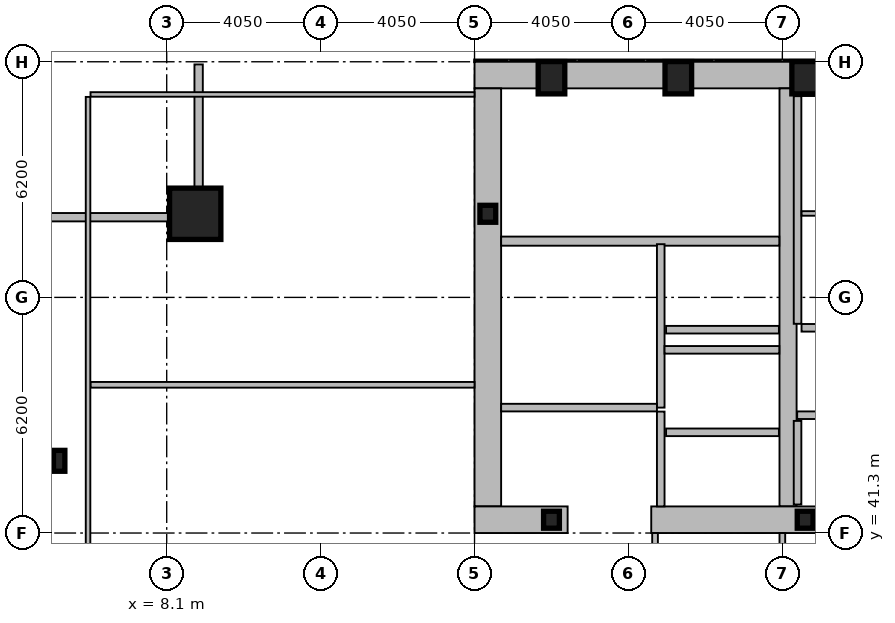
"""IFC4 building model, lengths in metres.
Left out: names, types, materials, properties, quantities, classifications, styles, units other than length and angle.
Written with IfcOpenShell. Run it as: python <this file> out.ifc"""

import sys

from ifc_helpers import new_model, si_unit, direction, frame, frame_2d, origin, origin_2d, place, context, subcontext, project, spatial, rectangle, hollow_rectangle, i_section, extrude, element, fill, save


model = new_model("IFC4")
c1 = context("Model", 3, precision=1e-05, world=origin(), true_north=direction((0.0, 1.0)))
c2 = subcontext(c1, "Body", "Model", "MODEL_VIEW")
j1 = project(units=[si_unit("LENGTHUNIT", "METRE"), si_unit("PLANEANGLEUNIT", "RADIAN")], contexts=[c1])
p1 = place(None, origin())
s1 = spatial("IfcSite", under=j1, at=p1, CompositionType="ELEMENT")
p2 = place(p1, origin())
s2 = spatial("IfcBuilding", under=s1, at=p2, CompositionType="ELEMENT")
p3 = place(p2, frame((0.0, 0.0, 154.2)))
s3 = spatial("IfcBuildingStorey", under=s2, at=p3, CompositionType="ELEMENT", Elevation=154.2)
p4 = place(p3, frame((16.2, 53.35, 0.0), z_axis=(0.0, 0.0, 1.0), x_axis=(1.0, 0.0, 0.0)))
e1 = element("IfcWall", 1, at=p4, inside=s3, PredefinedType="SHEAR", context=c2, shape_type="SweptSolid", body=[
    extrude(rectangle(XDim=40.5, YDim=0.7, at=frame_2d((20.25, 0.0))), origin(), (0.0, 0.0, 1.0), 3.44),
])
p5 = place(p3, frame((16.55, 42.0, 0.0), z_axis=(0.0, 0.0, 1.0), x_axis=(0.0, 1.0, 0.0)))
e2 = element("IfcWall", 2, at=p5, inside=s3, PredefinedType="SHEAR", context=c2, shape_type="SweptSolid", body=[
    extrude(rectangle(XDim=11.0, YDim=0.7, at=frame_2d((5.5, 0.0))), origin(), (0.0, 0.0, 1.0), 3.44),
])
p6 = place(p3, frame((24.45, 42.0, 0.0), z_axis=(0.0, 0.0, 1.0), x_axis=(0.0, 1.0, 0.0)))
e3 = element("IfcWall", 3, at=p6, inside=s3, PredefinedType="SHEAR", context=c2, shape_type="SweptSolid", body=[
    extrude(rectangle(XDim=11.0, YDim=0.45, at=frame_2d((5.5, 0.0))), origin(), (0.0, 0.0, 1.0), 3.44),
])
p7 = place(p3, frame((18.65, 41.65, 0.0), z_axis=(0.0, 0.0, 1.0), x_axis=(-1.0, 0.0, 0.0)))
e4 = element("IfcWall", 4, at=p7, inside=s3, PredefinedType="SHEAR", context=c2, shape_type="SweptSolid", body=[
    extrude(rectangle(XDim=2.45, YDim=0.7, at=frame_2d((1.225, 0.0))), origin(), (0.0, 0.0, 1.0), 3.44),
])
p8 = place(p3, frame((32.3, 41.65, 0.0), z_axis=(0.0, 0.0, 1.0), x_axis=(-1.0, 0.0, 0.0)))
e5 = element("IfcWall", 5, at=p8, inside=s3, PredefinedType="SHEAR", context=c2, shape_type="SweptSolid", body=[
    extrude(rectangle(XDim=11.45, YDim=0.7, at=frame_2d((5.725, 0.0))), origin(), (0.0, 0.0, 1.0), 3.44),
])
p9 = place(p3, frame((16.9, 48.98, 0.0), z_axis=(0.0, 0.0, 1.0), x_axis=(1.0, 0.0, 0.0)))
e6 = element("IfcWall", 6, at=p9, inside=s3, PredefinedType="SHEAR", context=c2, shape_type="SweptSolid", body=[
    extrude(rectangle(XDim=7.32, YDim=0.24, at=frame_2d((3.66, 0.0))), origin(), (0.0, 0.0, 1.0), 3.44),
])
p10 = place(p9, frame((0.22, 0.0, 0.0)))
e7 = element("IfcOpeningElement", 7, at=p10, cuts=e6, PredefinedType="OPENING", context=c2, shape_type="SweptSolid", body=[
    extrude(rectangle(XDim=1.05, YDim=2.15, at=frame_2d((0.525, 1.075))), frame((0.0, 0.13, 0.0), z_axis=(0.0, -1.0, 0.0), x_axis=(1.0, 0.0, 0.0)), (0.0, 0.0, 1.0), 0.26),
])
p11 = place(p3, frame((8.85, 49.7, 0.0), z_axis=(0.0, 0.0, 1.0), x_axis=(1.0, 0.0, 0.0)))
e8 = element("IfcColumn", 8, at=p11, inside=s3, PredefinedType="COLUMN", context=c2, shape_type="SweptSolid", body=[
    extrude(hollow_rectangle(XDim=1.35, YDim=1.35, WallThickness=0.065, at=origin_2d()), origin(), (0.0, 0.0, 1.0), 3.6),
])
for number, where, z_axis, x_axis in (
    (9, (18.225, 53.28, 0.0), (0.0, 0.0, 1.0), (1.0, 0.0, 0.0)),
    (10, (21.562, 53.28, 0.0), (0.0, 0.0, 1.0), (1.0, 0.0, 0.0)),
    (11, (24.9, 53.28, 0.0), (0.0, 0.0, 1.0), (1.0, 0.0, 0.0)),
):
    element("IfcColumn", number, at=place(p3, frame(where, z_axis=z_axis, x_axis=x_axis)), inside=s3, PredefinedType="COLUMN", context=c2, shape_type="SweptSolid", body=[
        extrude(hollow_rectangle(XDim=0.7, YDim=0.85, WallThickness=0.05, at=origin_2d()), origin(), (0.0, 0.0, 1.0), 3.6),
    ])
p12 = place(p3, frame((5.27, 43.2, 0.0), z_axis=(0.0, 0.0, 1.0), x_axis=(1.0, 0.0, 0.0)))
e12 = element("IfcColumn", 12, at=p12, inside=s3, PredefinedType="COLUMN", context=c2, shape_type="SweptSolid", body=[
    extrude(i_section(OverallWidth=0.3, OverallDepth=0.55, WebThickness=0.015, FlangeThickness=0.029, at=origin_2d()), origin(), (0.0, 0.0, 1.0), 3.6),
])
for number, where, z_axis, x_axis in (
    (13, (16.55, 49.7, 0.0), (0.0, 0.0, 1.0), (1.0, 0.0, 0.0)),
    (14, (18.225, 41.65, 0.0), (0.0, 0.0, 1.0), (1.0, 0.0, 0.0)),
    (15, (24.9, 41.65, 0.0), (0.0, 0.0, 1.0), (1.0, 0.0, 0.0)),
):
    element("IfcColumn", number, at=place(p3, frame(where, z_axis=z_axis, x_axis=x_axis)), inside=s3, PredefinedType="COLUMN", context=c2, shape_type="SweptSolid", body=[
        extrude(i_section(OverallWidth=0.416, OverallDepth=0.446, WebThickness=0.039, FlangeThickness=0.063, at=origin_2d()), origin(), (0.0, 0.0, 1.0), 3.6),
    ])
p13 = place(p3, frame((4.83, 49.61, 0.0), z_axis=(0.0, 0.0, 1.0), x_axis=(1.0, 0.0, 0.0)))
e16 = element("IfcWall", 16, at=p13, inside=s3, PredefinedType="SOLIDWALL", context=c2, shape_type="SweptSolid", body=[
    extrude(rectangle(XDim=4.22, YDim=0.22, at=frame_2d((2.11, 0.0))), origin(), (0.0, 0.0, 1.0), 2.83),
])
p14 = place(p3, frame((8.94, 49.72, 0.0), z_axis=(0.0, 0.0, 1.0), x_axis=(0.0, 1.0, 0.0)))
e17 = element("IfcWall", 17, at=p14, inside=s3, PredefinedType="SOLIDWALL", context=c2, shape_type="SweptSolid", body=[
    extrude(rectangle(XDim=3.91, YDim=0.22, at=frame_2d((1.955, 0.0))), origin(), (0.0, 0.0, 1.0), 2.83),
])
p15 = place(p3, frame((24.69, 44.4, 0.0), z_axis=(0.0, 0.0, 1.0), x_axis=(1.0, 0.0, 0.0)))
e18 = element("IfcWall", 18, at=p15, inside=s3, PredefinedType="PARTITIONING", context=c2, shape_type="SweptSolid", body=[
    extrude(rectangle(XDim=6.53, YDim=0.2, at=frame_2d((3.265, 0.0))), origin(), (0.0, 0.0, 1.0), 3.44),
])
p16 = place(p15, frame((0.53, 0.0, 0.0)))
e19 = element("IfcOpeningElement", 19, at=p16, cuts=e18, PredefinedType="OPENING", context=c2, shape_type="SweptSolid", body=[
    extrude(rectangle(XDim=1.1, YDim=2.18, at=frame_2d((0.55, 1.09))), frame((0.0, 0.11, 0.0), z_axis=(0.0, -1.0, 0.0), x_axis=(1.0, 0.0, 0.0)), (0.0, 0.0, 1.0), 0.22),
])
p17 = place(p15, frame((2.69, 0.0, 0.0)))
e20 = element("IfcOpeningElement", 20, at=p17, cuts=e18, PredefinedType="OPENING", context=c2, shape_type="SweptSolid", body=[
    extrude(rectangle(XDim=1.1, YDim=2.18, at=frame_2d((0.55, 1.09))), frame((0.0, 0.11, 0.0), z_axis=(0.0, -1.0, 0.0), x_axis=(1.0, 0.0, 0.0)), (0.0, 0.0, 1.0), 0.22),
])
p18 = place(p15, frame((4.85, 0.0, 0.0)))
e21 = element("IfcOpeningElement", 21, at=p18, cuts=e18, PredefinedType="OPENING", context=c2, shape_type="SweptSolid", body=[
    extrude(rectangle(XDim=1.1, YDim=2.18, at=frame_2d((0.55, 1.09))), frame((0.0, 0.11, 0.0), z_axis=(0.0, -1.0, 0.0), x_axis=(1.0, 0.0, 0.0)), (0.0, 0.0, 1.0), 0.22),
])
p19 = place(p3, frame((24.21, 43.95, 0.0), z_axis=(0.0, 0.0, 1.0), x_axis=(-1.0, 0.0, 0.0)))
e22 = element("IfcWall", 22, at=p19, inside=s3, PredefinedType="PARTITIONING", context=c2, shape_type="SweptSolid", body=[
    extrude(rectangle(XDim=2.97, YDim=0.2, at=frame_2d((1.485, 0.0))), origin(), (0.0, 0.0, 1.0), 3.44),
])
p20 = place(p19, frame((0.86, 0.0, 0.0)))
e23 = element("IfcOpeningElement", 23, at=p20, cuts=e22, PredefinedType="OPENING", context=c2, shape_type="SweptSolid", body=[
    extrude(rectangle(XDim=1.3, YDim=2.18, at=frame_2d((0.65, 1.09))), frame((0.0, 0.11, 0.0), z_axis=(0.0, -1.0, 0.0), x_axis=(1.0, 0.0, 0.0)), (0.0, 0.0, 1.0), 0.22),
])
p21 = place(p3, frame((24.21, 46.65, 0.0), z_axis=(0.0, 0.0, 1.0), x_axis=(-1.0, 0.0, 0.0)))
e24 = element("IfcWall", 24, at=p21, inside=s3, PredefinedType="PARTITIONING", context=c2, shape_type="SweptSolid", body=[
    extrude(rectangle(XDim=2.97, YDim=0.2, at=frame_2d((1.485, 0.0))), origin(), (0.0, 0.0, 1.0), 3.44),
])
p22 = place(p21, frame((0.91, 0.0, 0.0)))
e25 = element("IfcOpeningElement", 25, at=p22, cuts=e24, PredefinedType="OPENING", context=c2, shape_type="SweptSolid", body=[
    extrude(rectangle(XDim=1.2, YDim=2.18, at=frame_2d((0.6, 1.09))), frame((0.0, 0.11, 0.0), z_axis=(0.0, -1.0, 0.0), x_axis=(1.0, 0.0, 0.0)), (0.0, 0.0, 1.0), 0.22),
])
p23 = place(p3, frame((21.1, 44.6, 0.0), z_axis=(0.0, 0.0, 1.0), x_axis=(0.0, 1.0, 0.0)))
e26 = element("IfcWall", 26, at=p23, inside=s3, PredefinedType="PARTITIONING", context=c2, shape_type="SweptSolid", body=[
    extrude(rectangle(XDim=4.3, YDim=0.2, at=frame_2d((2.15, 0.0))), origin(), (0.0, 0.0, 1.0), 3.44),
])
p24 = place(p3, frame((16.9, 44.6, 0.0), z_axis=(0.0, 0.0, 1.0), x_axis=(1.0, 0.0, 0.0)))
e27 = element("IfcWall", 27, at=p24, inside=s3, PredefinedType="PARTITIONING", context=c2, shape_type="SweptSolid", body=[
    extrude(rectangle(XDim=4.1, YDim=0.2, at=frame_2d((2.05, 0.0))), origin(), (0.0, 0.0, 1.0), 3.44),
])
p25 = place(p24, frame((1.25, 0.0, 0.0)))
e28 = element("IfcOpeningElement", 28, at=p25, cuts=e27, PredefinedType="OPENING", context=c2, shape_type="SweptSolid", body=[
    extrude(rectangle(XDim=1.05, YDim=2.15, at=frame_2d((0.525, 1.075))), frame((0.0, 0.11, 0.0), z_axis=(0.0, -1.0, 0.0), x_axis=(1.0, 0.0, 0.0)), (0.0, 0.0, 1.0), 0.22),
])
p26 = place(p3, frame((21.2, 46.12, 0.0), z_axis=(0.0, 0.0, 1.0), x_axis=(1.0, 0.0, 0.0)))
e29 = element("IfcWall", 29, at=p26, inside=s3, PredefinedType="PARTITIONING", context=c2, shape_type="SweptSolid", body=[
    extrude(rectangle(XDim=3.02, YDim=0.2, at=frame_2d((1.51, 0.0))), origin(), (0.0, 0.0, 1.0), 3.44),
])
p27 = place(p3, frame((21.1, 42.0, 0.0), z_axis=(0.0, 0.0, 1.0), x_axis=(0.0, 1.0, 0.0)))
e30 = element("IfcWall", 30, at=p27, inside=s3, PredefinedType="PARTITIONING", context=c2, shape_type="SweptSolid", body=[
    extrude(rectangle(XDim=2.495, YDim=0.2, at=frame_2d((1.248, 0.0))), origin(), (0.0, 0.0, 1.0), 3.44),
])
p28 = place(p27, frame((0.38, 0.0, 0.0)))
e31 = element("IfcOpeningElement", 31, at=p28, cuts=e30, PredefinedType="OPENING", context=c2, shape_type="SweptSolid", body=[
    extrude(rectangle(XDim=1.05, YDim=2.15, at=frame_2d((0.525, 1.075))), frame((0.0, 0.11, 0.0), z_axis=(0.0, -1.0, 0.0), x_axis=(1.0, 0.0, 0.0)), (0.0, 0.0, 1.0), 0.22),
])
p29 = place(p3, frame((24.7, 46.805, 0.0), z_axis=(0.0, 0.0, 1.0), x_axis=(0.0, 1.0, 0.0)))
e32 = element("IfcWall", 32, at=p29, inside=s3, PredefinedType="PARTITIONING", context=c2, shape_type="SweptSolid", body=[
    extrude(rectangle(XDim=5.99, YDim=0.2, at=frame_2d((2.995, 0.0))), origin(), (0.0, 0.0, 1.0), 3.44),
])
p30 = place(p3, frame((24.805, 52.86, 0.0), z_axis=(0.0, 0.0, 1.0), x_axis=(1.0, 0.0, 0.0)))
e33 = element("IfcWall", 33, at=p30, inside=s3, PredefinedType="PARTITIONING", context=c2, shape_type="SweptSolid", body=[
    extrude(rectangle(XDim=7.51, YDim=0.12, at=frame_2d((3.755, 0.0))), origin(), (0.0, 0.0, 1.0), 3.44),
])
p31 = place(p3, frame((24.805, 49.709, 0.0), z_axis=(0.0, 0.0, 1.0), x_axis=(1.0, 0.0, 0.0)))
e34 = element("IfcWall", 34, at=p31, inside=s3, PredefinedType="PARTITIONING", context=c2, shape_type="SweptSolid", body=[
    extrude(rectangle(XDim=7.51, YDim=0.12, at=frame_2d((3.755, 0.0))), origin(), (0.0, 0.0, 1.0), 3.44),
])
p32 = place(p31, frame((2.4, 0.0, 0.0)))
e35 = element("IfcOpeningElement", 35, at=p32, cuts=e34, PredefinedType="OPENING", context=c2, shape_type="SweptSolid", body=[
    extrude(rectangle(XDim=0.9, YDim=2.05, at=frame_2d((0.45, 1.025))), frame((0.0, 0.07, 0.0), z_axis=(0.0, -1.0, 0.0), x_axis=(1.0, 0.0, 0.0)), (0.0, 0.0, 1.0), 0.14),
])
p33 = place(p3, frame((24.805, 46.7, 0.0), z_axis=(0.0, 0.0, 1.0), x_axis=(1.0, 0.0, 0.0)))
e36 = element("IfcWall", 36, at=p33, inside=s3, PredefinedType="PARTITIONING", context=c2, shape_type="SweptSolid", body=[
    extrude(rectangle(XDim=7.51, YDim=0.2, at=frame_2d((3.755, 0.0))), origin(), (0.0, 0.0, 1.0), 3.44),
])
p34 = place(p33, frame((2.4, 0.0, 0.0)))
e37 = element("IfcOpeningElement", 37, at=p34, cuts=e36, PredefinedType="OPENING", context=c2, shape_type="SweptSolid", body=[
    extrude(rectangle(XDim=0.95, YDim=2.1, at=frame_2d((0.475, 1.05))), frame((0.0, 0.11, 0.0), z_axis=(0.0, -1.0, 0.0), x_axis=(1.0, 0.0, 0.0)), (0.0, 0.0, 1.0), 0.22),
])
p35 = place(p3, frame((24.7, 42.05, 0.0), z_axis=(0.0, 0.0, 1.0), x_axis=(0.0, 1.0, 0.0)))
e38 = element("IfcWall", 38, at=p35, inside=s3, PredefinedType="PARTITIONING", context=c2, shape_type="SweptSolid", body=[
    extrude(rectangle(XDim=2.2, YDim=0.2, at=frame_2d((1.1, 0.0))), origin(), (0.0, 0.0, 1.0), 3.44),
])
for number, where, z_axis, x_axis in (
    (39, (20.95, 38.28, 0.0), (0.0, 0.0, 1.0), (0.0, 1.0, 0.0)),
    (40, (24.3, 38.28, 0.0), (0.0, 0.0, 1.0), (0.0, 1.0, 0.0)),
):
    element("IfcWall", number, at=place(p3, frame(where, z_axis=z_axis, x_axis=x_axis)), inside=s3, PredefinedType="PARTITIONING", context=c2, shape_type="SweptSolid", body=[
        extrude(rectangle(XDim=3.02, YDim=0.15, at=frame_2d((1.51, 0.0))), origin(), (0.0, 0.0, 1.0), 3.44),
    ])
p36 = place(p3, frame((6.095, 45.2, 0.0), z_axis=(0.0, 0.0, 1.0), x_axis=(1.0, 0.0, 0.0)))
e41 = element("IfcWall", 41, at=p36, inside=s3, PredefinedType="PARTITIONING", context=c2, shape_type="SweptSolid", body=[
    extrude(rectangle(XDim=10.105, YDim=0.15, at=frame_2d((5.052, 0.0))), origin(), (0.0, 0.0, 1.0), 2.83),
])
p37 = place(p36, frame((8.32, 0.0, 0.0)))
e42 = element("IfcOpeningElement", 42, at=p37, cuts=e41, PredefinedType="OPENING", context=c2, shape_type="SweptSolid", body=[
    extrude(rectangle(XDim=0.9, YDim=2.05, at=frame_2d((0.45, 1.025))), frame((0.0, 0.085, 0.0), z_axis=(0.0, -1.0, 0.0), x_axis=(1.0, 0.0, 0.0)), (0.0, 0.0, 1.0), 0.17),
])
p38 = place(p3, frame((6.03, 10.665, 0.0), z_axis=(0.0, 0.0, 1.0), x_axis=(0.0, 1.0, 0.0)))
e43 = element("IfcWall", 43, at=p38, inside=s3, PredefinedType="PARTITIONING", context=c2, shape_type="SweptSolid", body=[
    extrude(rectangle(XDim=42.11, YDim=0.12, at=frame_2d((21.055, 0.0))), origin(), (0.0, 0.0, 1.0), 2.73),
])
p39 = place(p3, frame((6.095, 52.84, 0.0), z_axis=(0.0, 0.0, 1.0), x_axis=(1.0, 0.0, 0.0)))
e44 = element("IfcWall", 44, at=p39, inside=s3, PredefinedType="PARTITIONING", context=c2, shape_type="SweptSolid", body=[
    extrude(rectangle(XDim=10.105, YDim=0.12, at=frame_2d((5.052, 0.0))), origin(), (0.0, 0.0, 1.0), 3.44),
])
p40 = place(p10, origin())
e45 = element("IfcDoor", 45, at=p40, inside=s3, OperationType="SINGLE_SWING_LEFT", PredefinedType="DOOR", context=c2, shape_type="SweptSolid", body=[
    extrude(rectangle(XDim=1.05, YDim=2.15, at=frame_2d((0.525, 1.075))), frame((0.0, 0.025, 0.0), z_axis=(0.0, -1.0, 0.0), x_axis=(1.0, 0.0, 0.0)), (0.0, 0.0, 1.0), 0.05),
])
fill(e7, e45)
p41 = place(p20, origin())
e46 = element("IfcDoor", 46, at=p41, inside=s3, OperationType="SLIDING_TO_LEFT", PredefinedType="DOOR", context=c2, shape_type="SweptSolid", body=[
    extrude(rectangle(XDim=1.3, YDim=2.18, at=frame_2d((0.65, 1.09))), frame((0.0, 0.025, 0.0), z_axis=(0.0, -1.0, 0.0), x_axis=(1.0, 0.0, 0.0)), (0.0, 0.0, 1.0), 0.05),
])
fill(e23, e46)
p42 = place(p22, origin())
e47 = element("IfcDoor", 47, at=p42, inside=s3, OperationType="SLIDING_TO_LEFT", PredefinedType="DOOR", context=c2, shape_type="SweptSolid", body=[
    extrude(rectangle(XDim=1.2, YDim=2.18, at=frame_2d((0.6, 1.09))), frame((0.0, 0.025, 0.0), z_axis=(0.0, -1.0, 0.0), x_axis=(1.0, 0.0, 0.0)), (0.0, 0.0, 1.0), 0.05),
])
fill(e25, e47)
p43 = place(p25, origin())
e48 = element("IfcDoor", 48, at=p43, inside=s3, OperationType="SINGLE_SWING_LEFT", PredefinedType="DOOR", context=c2, shape_type="SweptSolid", body=[
    extrude(rectangle(XDim=1.05, YDim=2.15, at=frame_2d((0.525, 1.075))), frame((0.0, 0.025, 0.0), z_axis=(0.0, -1.0, 0.0), x_axis=(1.0, 0.0, 0.0)), (0.0, 0.0, 1.0), 0.05),
])
fill(e28, e48)
p44 = place(p28, origin())
e49 = element("IfcDoor", 49, at=p44, inside=s3, OperationType="SINGLE_SWING_RIGHT", PredefinedType="DOOR", context=c2, shape_type="SweptSolid", body=[
    extrude(rectangle(XDim=1.05, YDim=2.15, at=frame_2d((0.525, 1.075))), frame((0.0, 0.025, 0.0), z_axis=(0.0, -1.0, 0.0), x_axis=(1.0, 0.0, 0.0)), (0.0, 0.0, 1.0), 0.05),
])
fill(e31, e49)
p45 = place(p37, origin())
e50 = element("IfcDoor", 50, at=p45, inside=s3, OperationType="SINGLE_SWING_RIGHT", PredefinedType="DOOR", context=c2, shape_type="SweptSolid", body=[
    extrude(rectangle(XDim=0.9, YDim=2.05, at=frame_2d((0.45, 1.025))), frame((0.0, 0.025, 0.0), z_axis=(0.0, -1.0, 0.0), x_axis=(1.0, 0.0, 0.0)), (0.0, 0.0, 1.0), 0.05),
])
fill(e42, e50)
save(model, sys.argv[1])
